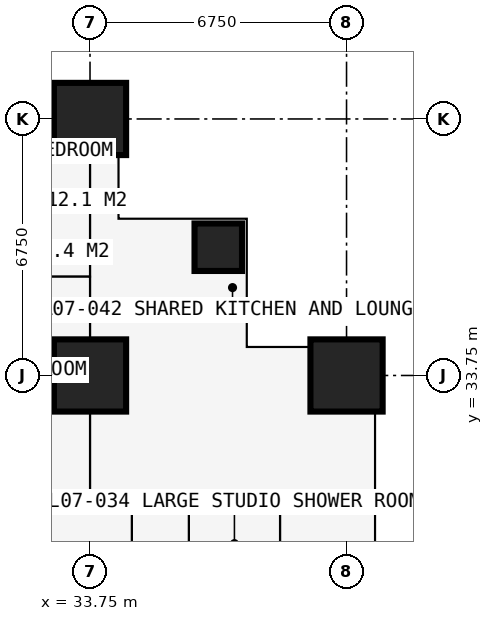
"""IFC4 building model, lengths in metres.
Left out: names, types, materials, properties, quantities, classifications, styles, units other than length and angle.
Written with IfcOpenShell. Run it as: python <this file> out.ifc"""

import sys

from ifc_helpers import new_model, si_unit, direction, frame, frame_2d, origin, origin_2d, place, context, subcontext, project, spatial, rectangle, extrude, element, fill, save


model = new_model("IFC4")
c1 = context("Model", 3, precision=1e-05, world=origin(), true_north=direction((0.0, 1.0)))
c2 = subcontext(c1, "Body", "Model", "MODEL_VIEW")
j1 = project(units=[si_unit("LENGTHUNIT", "METRE"), si_unit("PLANEANGLEUNIT", "RADIAN")], contexts=[c1])
p1 = place(None, origin())
s1 = spatial("IfcSite", under=j1, at=p1, CompositionType="ELEMENT")
p2 = place(p1, origin())
s2 = spatial("IfcBuilding", under=s1, at=p2, CompositionType="ELEMENT")
p3 = place(p2, frame((0.0, 0.0, 28.8)))
s3 = spatial("IfcBuildingStorey", under=s2, at=p3, CompositionType="ELEMENT", Elevation=28.8)
for number, where, z_axis, x_axis in (
    (1, (33.75, 33.75, 0.0), (0.0, 0.0, 1.0), (1.0, 0.0, 0.0)),
    (2, (33.75, 40.5, 0.0), (0.0, 0.0, 1.0), (1.0, 0.0, 0.0)),
):
    element("IfcColumn", number, at=place(p3, frame(where, z_axis=z_axis, x_axis=x_axis)), inside=s3, PredefinedType="COLUMN", context=c2, shape_type="SweptSolid", body=[
        extrude(rectangle(XDim=1.9, YDim=1.9, at=origin_2d()), origin(), (0.0, 0.0, 1.0), 3.6),
    ])
p4 = place(p3, frame((37.125, 37.125, 0.0), z_axis=(0.0, 0.0, 1.0), x_axis=(1.0, 0.0, 0.0)))
e3 = element("IfcColumn", 3, at=p4, inside=s3, PredefinedType="COLUMN", context=c2, shape_type="SweptSolid", body=[
    extrude(rectangle(XDim=1.25, YDim=1.25, at=origin_2d()), origin(), (0.0, 0.0, 1.0), 3.6),
])
p5 = place(p3, frame((40.5, 33.75, 0.0), z_axis=(0.0, 0.0, 1.0), x_axis=(1.0, 0.0, 0.0)))
e4 = element("IfcColumn", 4, at=p5, inside=s3, PredefinedType="COLUMN", context=c2, shape_type="SweptSolid", body=[
    extrude(rectangle(XDim=1.9, YDim=1.9, at=origin_2d()), origin(), (0.0, 0.0, 1.0), 3.6),
])
p6 = place(p3, frame((41.25, 34.5, 0.0), z_axis=(0.0, 0.0, 1.0), x_axis=(-1.0, 0.0, 0.0)))
e5 = element("IfcWall", 5, at=p6, inside=s3, PredefinedType="SOLIDWALL", context=c2, shape_type="SweptSolid", body=[
    extrude(rectangle(XDim=3.375, YDim=0.3, at=frame_2d((1.688, 0.0))), origin(), (0.0, 0.0, 1.0), 3.375),
])
p7 = place(p6, frame((1.857, 0.0, 0.9)))
e6 = element("IfcOpeningElement", 6, at=p7, cuts=e5, PredefinedType="OPENING", context=c2, shape_type="SweptSolid", body=[
    extrude(rectangle(XDim=1.2, YDim=1.8, at=frame_2d((0.6, 0.9))), frame((0.0, 0.16, 0.0), z_axis=(0.0, -1.0, 0.0), x_axis=(1.0, 0.0, 0.0)), (0.0, 0.0, 1.0), 0.32),
])
p8 = place(p3, frame((37.875, 34.5, 0.0), z_axis=(0.0, 0.0, 1.0), x_axis=(0.0, 1.0, 0.0)))
e7 = element("IfcWall", 7, at=p8, inside=s3, PredefinedType="SOLIDWALL", context=c2, shape_type="SweptSolid", body=[
    extrude(rectangle(XDim=3.375, YDim=0.3, at=frame_2d((1.688, 0.0))), origin(), (0.0, 0.0, 1.0), 3.375),
])
p9 = place(p8, frame((0.788, 0.0, 0.6)))
e8 = element("IfcOpeningElement", 8, at=p9, cuts=e7, PredefinedType="OPENING", context=c2, shape_type="SweptSolid", body=[
    extrude(rectangle(XDim=1.8, YDim=2.1, at=frame_2d((0.9, 1.05))), frame((0.0, 0.16, 0.0), z_axis=(0.0, -1.0, 0.0), x_axis=(1.0, 0.0, 0.0)), (0.0, 0.0, 1.0), 0.32),
])
p10 = place(p3, frame((37.875, 37.875, 0.0), z_axis=(0.0, 0.0, 1.0), x_axis=(-1.0, 0.0, 0.0)))
e9 = element("IfcWall", 9, at=p10, inside=s3, PredefinedType="SOLIDWALL", context=c2, shape_type="SweptSolid", body=[
    extrude(rectangle(XDim=3.375, YDim=0.3, at=frame_2d((1.688, 0.0))), origin(), (0.0, 0.0, 1.0), 3.375),
])
p11 = place(p10, frame((0.788, 0.0, 0.6)))
e10 = element("IfcOpeningElement", 10, at=p11, cuts=e9, PredefinedType="OPENING", context=c2, shape_type="SweptSolid", body=[
    extrude(rectangle(XDim=1.8, YDim=2.1, at=frame_2d((0.9, 1.05))), frame((0.0, 0.16, 0.0), z_axis=(0.0, -1.0, 0.0), x_axis=(1.0, 0.0, 0.0)), (0.0, 0.0, 1.0), 0.32),
])
p12 = place(p3, frame((34.5, 37.875, 0.0), z_axis=(0.0, 0.0, 1.0), x_axis=(0.0, 1.0, 0.0)))
e11 = element("IfcWall", 11, at=p12, inside=s3, PredefinedType="SOLIDWALL", context=c2, shape_type="SweptSolid", body=[
    extrude(rectangle(XDim=3.375, YDim=0.3, at=frame_2d((1.688, 0.0))), origin(), (0.0, 0.0, 1.0), 3.375),
])
p13 = place(p12, frame((0.317, 0.0, 0.9)))
e12 = element("IfcOpeningElement", 12, at=p13, cuts=e11, PredefinedType="OPENING", context=c2, shape_type="SweptSolid", body=[
    extrude(rectangle(XDim=1.2, YDim=1.8, at=frame_2d((0.6, 0.9))), frame((0.0, 0.16, 0.0), z_axis=(0.0, -1.0, 0.0), x_axis=(1.0, 0.0, 0.0)), (0.0, 0.0, 1.0), 0.32),
])
p14 = place(p3, frame((10.125, 36.35, 0.0), z_axis=(0.0, 0.0, 1.0), x_axis=(1.0, 0.0, 0.0)))
e13 = element("IfcWall", 13, at=p14, inside=s3, PredefinedType="PARTITIONING", context=c2, shape_type="SweptSolid", body=[
    extrude(rectangle(XDim=23.625, YDim=0.15, at=frame_2d((11.812, 0.0))), origin(), (0.0, 0.0, 1.0), 3.375),
])
p15 = place(p14, frame((20.5, 0.0, 0.0)))
e14 = element("IfcOpeningElement", 14, at=p15, cuts=e13, PredefinedType="OPENING", context=c2, shape_type="SweptSolid", body=[
    extrude(rectangle(XDim=0.95, YDim=2.2, at=frame_2d((0.475, 1.1))), frame((0.0, 0.085, 0.0), z_axis=(0.0, -1.0, 0.0), x_axis=(1.0, 0.0, 0.0)), (0.0, 0.0, 1.0), 0.17),
])
p16 = place(p14, frame((17.125, 0.0, 0.0)))
e15 = element("IfcOpeningElement", 15, at=p16, cuts=e13, PredefinedType="OPENING", context=c2, shape_type="SweptSolid", body=[
    extrude(rectangle(XDim=0.95, YDim=2.2, at=frame_2d((0.475, 1.1))), frame((0.0, 0.085, 0.0), z_axis=(0.0, -1.0, 0.0), x_axis=(1.0, 0.0, 0.0)), (0.0, 0.0, 1.0), 0.17),
])
p17 = place(p14, frame((13.7, 0.0, 0.0)))
e16 = element("IfcOpeningElement", 16, at=p17, cuts=e13, PredefinedType="OPENING", context=c2, shape_type="SweptSolid", body=[
    extrude(rectangle(XDim=0.95, YDim=2.2, at=frame_2d((0.475, 1.1))), frame((0.0, 0.085, 0.0), z_axis=(0.0, -1.0, 0.0), x_axis=(1.0, 0.0, 0.0)), (0.0, 0.0, 1.0), 0.17),
])
p18 = place(p14, frame((4.2, 0.0, 0.0)))
e17 = element("IfcOpeningElement", 17, at=p18, cuts=e13, PredefinedType="OPENING", context=c2, shape_type="SweptSolid", body=[
    extrude(rectangle(XDim=0.95, YDim=2.2, at=frame_2d((0.475, 1.1))), frame((0.0, 0.085, 0.0), z_axis=(0.0, -1.0, 0.0), x_axis=(1.0, 0.0, 0.0)), (0.0, 0.0, 1.0), 0.17),
])
p19 = place(p14, frame((10.95, 0.0, 0.0)))
e18 = element("IfcOpeningElement", 18, at=p19, cuts=e13, PredefinedType="OPENING", context=c2, shape_type="SweptSolid", body=[
    extrude(rectangle(XDim=0.95, YDim=2.2, at=frame_2d((0.475, 1.1))), frame((0.0, 0.085, 0.0), z_axis=(0.0, -1.0, 0.0), x_axis=(1.0, 0.0, 0.0)), (0.0, 0.0, 1.0), 0.17),
])
p20 = place(p3, frame((30.375, 30.375, 0.0), z_axis=(0.0, 0.0, 1.0), x_axis=(1.0, 0.0, 0.0)))
e19 = element("IfcWall", 19, at=p20, inside=s3, PredefinedType="PARTITIONING", context=c2, shape_type="SweptSolid", body=[
    extrude(rectangle(XDim=10.859, YDim=0.15, at=frame_2d((5.429, 0.0))), origin(), (0.0, 0.0, 1.0), 3.375),
])
p21 = place(p3, frame((31.75, 38.55, 0.0), z_axis=(0.0, 0.0, 1.0), x_axis=(1.0, 0.0, 0.0)))
e20 = element("IfcWall", 20, at=p21, inside=s3, PredefinedType="PARTITIONING", context=c2, shape_type="SweptSolid", body=[
    extrude(rectangle(XDim=2.0, YDim=0.1, at=frame_2d((1.0, 0.0))), origin(), (0.0, 0.0, 1.0), 3.375),
])
p22 = place(p3, frame((33.75, 30.375, 0.0), z_axis=(0.0, 0.0, 1.0), x_axis=(0.0, 1.0, 0.0)))
e21 = element("IfcWall", 21, at=p22, inside=s3, PredefinedType="PARTITIONING", context=c2, shape_type="SweptSolid", body=[
    extrude(rectangle(XDim=10.859, YDim=0.15, at=frame_2d((5.429, 0.0))), origin(), (0.0, 0.0, 1.0), 2.877),
])
p23 = place(p22, frame((1.4, 0.0, 0.0)))
e22 = element("IfcOpeningElement", 22, at=p23, cuts=e21, PredefinedType="OPENING", context=c2, shape_type="SweptSolid", body=[
    extrude(rectangle(XDim=1.0, YDim=2.2, at=frame_2d((0.5, 1.1))), frame((0.0, 0.085, 0.0), z_axis=(0.0, -1.0, 0.0), x_axis=(1.0, 0.0, 0.0)), (0.0, 0.0, 1.0), 0.17),
])
p24 = place(p3, frame((34.85, 12.55, 0.0), z_axis=(0.0, 0.0, 1.0), x_axis=(0.0, 1.0, 0.0)))
e23 = element("IfcWall", 23, at=p24, inside=s3, PredefinedType="PARTITIONING", context=c2, shape_type="SweptSolid", body=[
    extrude(rectangle(XDim=17.825, YDim=0.15, at=frame_2d((8.913, 0.0))), origin(), (0.0, 0.0, 1.0), 3.375),
])
p25 = place(p24, frame((8.65, 0.0, 0.0)))
e24 = element("IfcOpeningElement", 24, at=p25, cuts=e23, PredefinedType="OPENING", context=c2, shape_type="SweptSolid", body=[
    extrude(rectangle(XDim=0.95, YDim=2.2, at=frame_2d((0.475, 1.1))), frame((0.0, 0.085, 0.0), z_axis=(0.0, -1.0, 0.0), x_axis=(1.0, 0.0, 0.0)), (0.0, 0.0, 1.0), 0.17),
])
p26 = place(p3, frame((36.35, 6.75, 0.0), z_axis=(0.0, 0.0, 1.0), x_axis=(0.0, 1.0, 0.0)))
e25 = element("IfcWall", 25, at=p26, inside=s3, PredefinedType="PARTITIONING", context=c2, shape_type="SweptSolid", body=[
    extrude(rectangle(XDim=23.625, YDim=0.15, at=frame_2d((11.812, 0.0))), origin(), (0.0, 0.0, 1.0), 3.375),
])
p27 = place(p26, frame((18.475, 0.0, 0.0)))
e26 = element("IfcOpeningElement", 26, at=p27, cuts=e25, PredefinedType="OPENING", context=c2, shape_type="SweptSolid", body=[
    extrude(rectangle(XDim=0.95, YDim=2.2, at=frame_2d((0.475, 1.1))), frame((0.0, 0.085, 0.0), z_axis=(0.0, -1.0, 0.0), x_axis=(1.0, 0.0, 0.0)), (0.0, 0.0, 1.0), 0.17),
])
p28 = place(p26, frame((11.725, 0.0, 0.0)))
e27 = element("IfcOpeningElement", 27, at=p28, cuts=e25, PredefinedType="OPENING", context=c2, shape_type="SweptSolid", body=[
    extrude(rectangle(XDim=0.95, YDim=2.2, at=frame_2d((0.475, 1.1))), frame((0.0, 0.085, 0.0), z_axis=(0.0, -1.0, 0.0), x_axis=(1.0, 0.0, 0.0)), (0.0, 0.0, 1.0), 0.17),
])
p29 = place(p26, frame((6.95, 0.0, 0.0)))
e28 = element("IfcOpeningElement", 28, at=p29, cuts=e25, PredefinedType="OPENING", context=c2, shape_type="SweptSolid", body=[
    extrude(rectangle(XDim=0.95, YDim=2.2, at=frame_2d((0.475, 1.1))), frame((0.0, 0.085, 0.0), z_axis=(0.0, -1.0, 0.0), x_axis=(1.0, 0.0, 0.0)), (0.0, 0.0, 1.0), 0.17),
])
p30 = place(p3, frame((38.75, 27.775, 0.0), z_axis=(0.0, 0.0, 1.0), x_axis=(0.0, 1.0, 0.0)))
e29 = element("IfcWall", 29, at=p30, inside=s3, PredefinedType="PARTITIONING", context=c2, shape_type="SweptSolid", body=[
    extrude(rectangle(XDim=2.6, YDim=0.1, at=frame_2d((1.3, 0.0))), origin(), (0.0, 0.0, 1.0), 3.375),
])
p31 = place(p30, frame((0.85, 0.0, 0.0)))
e30 = element("IfcOpeningElement", 30, at=p31, cuts=e29, PredefinedType="OPENING", context=c2, shape_type="SweptSolid", body=[
    extrude(rectangle(XDim=0.9, YDim=2.2, at=frame_2d((0.45, 1.1))), frame((0.0, 0.06, 0.0), z_axis=(0.0, -1.0, 0.0), x_axis=(1.0, 0.0, 0.0)), (0.0, 0.0, 1.0), 0.12),
])
p32 = place(p7, origin())
e31 = element("IfcWindow", 31, at=p32, inside=s3, PartitioningType="SINGLE_PANEL", PredefinedType="WINDOW", context=c2, shape_type="SweptSolid", body=[
    extrude(rectangle(XDim=1.2, YDim=1.8, at=frame_2d((0.6, 0.9))), frame((0.0, 0.03, 0.0), z_axis=(0.0, -1.0, 0.0), x_axis=(1.0, 0.0, 0.0)), (0.0, 0.0, 1.0), 0.06),
])
fill(e6, e31)
p33 = place(p9, origin())
e32 = element("IfcWindow", 32, at=p33, inside=s3, PartitioningType="SINGLE_PANEL", PredefinedType="WINDOW", context=c2, shape_type="SweptSolid", body=[
    extrude(rectangle(XDim=1.8, YDim=2.1, at=frame_2d((0.9, 1.05))), frame((0.0, 0.03, 0.0), z_axis=(0.0, -1.0, 0.0), x_axis=(1.0, 0.0, 0.0)), (0.0, 0.0, 1.0), 0.06),
])
fill(e8, e32)
p34 = place(p11, origin())
e33 = element("IfcWindow", 33, at=p34, inside=s3, PartitioningType="SINGLE_PANEL", PredefinedType="WINDOW", context=c2, shape_type="SweptSolid", body=[
    extrude(rectangle(XDim=1.8, YDim=2.1, at=frame_2d((0.9, 1.05))), frame((0.0, 0.03, 0.0), z_axis=(0.0, -1.0, 0.0), x_axis=(1.0, 0.0, 0.0)), (0.0, 0.0, 1.0), 0.06),
])
fill(e10, e33)
p35 = place(p13, origin())
e34 = element("IfcWindow", 34, at=p35, inside=s3, PartitioningType="SINGLE_PANEL", PredefinedType="WINDOW", context=c2, shape_type="SweptSolid", body=[
    extrude(rectangle(XDim=1.2, YDim=1.8, at=frame_2d((0.6, 0.9))), frame((0.0, 0.03, 0.0), z_axis=(0.0, -1.0, 0.0), x_axis=(1.0, 0.0, 0.0)), (0.0, 0.0, 1.0), 0.06),
])
fill(e12, e34)
p36 = place(p31, origin())
e35 = element("IfcDoor", 35, at=p36, inside=s3, OperationType="SINGLE_SWING_RIGHT", PredefinedType="DOOR", context=c2, shape_type="SweptSolid", body=[
    extrude(rectangle(XDim=0.9, YDim=2.2, at=frame_2d((0.45, 1.1))), frame((0.0, 0.025, 0.0), z_axis=(0.0, -1.0, 0.0), x_axis=(1.0, 0.0, 0.0)), (0.0, 0.0, 1.0), 0.05),
])
fill(e30, e35)
p37 = place(p23, origin())
e36 = element("IfcDoor", 36, at=p37, inside=s3, OperationType="SINGLE_SWING_LEFT", PredefinedType="DOOR", context=c2, shape_type="SweptSolid", body=[
    extrude(rectangle(XDim=1.0, YDim=2.2, at=frame_2d((0.5, 1.1))), frame((0.0, 0.025, 0.0), z_axis=(0.0, -1.0, 0.0), x_axis=(1.0, 0.0, 0.0)), (0.0, 0.0, 1.0), 0.05),
])
fill(e22, e36)
save(model, sys.argv[1])
